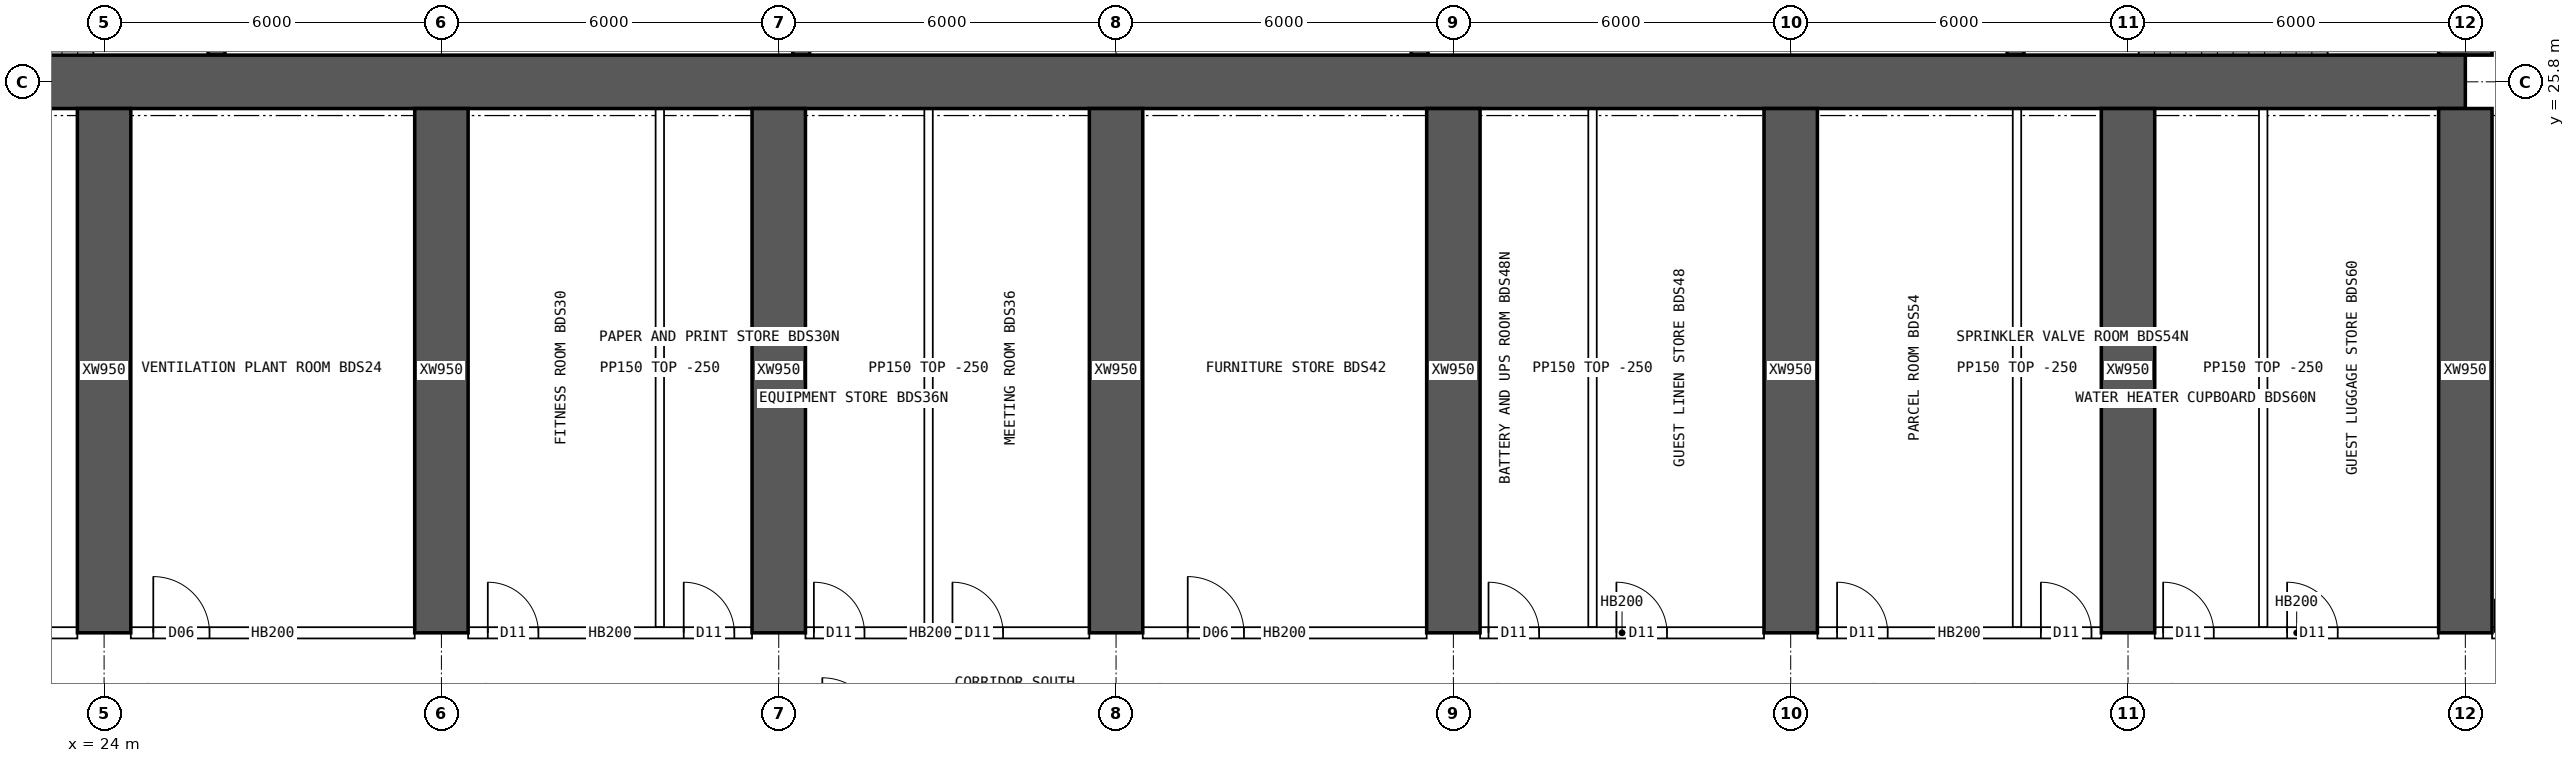
"""IFC4 building model, lengths in metres.
Left out: names, types, materials, properties, quantities, classifications, styles, units other than length and angle.
Written with IfcOpenShell. Run it as: python <this file> out.ifc"""

import sys

from ifc_helpers import new_model, si_unit, direction, frame, frame_2d, origin, place, context, subcontext, project, spatial, rectangle, extrude, element, fill, save


model = new_model("IFC4")
c1 = context("Model", 3, precision=1e-05, world=origin(), true_north=direction((0.0, 1.0)))
c2 = subcontext(c1, "Body", "Model", "MODEL_VIEW")
j1 = project(units=[si_unit("LENGTHUNIT", "METRE"), si_unit("PLANEANGLEUNIT", "RADIAN")], contexts=[c1])
p1 = place(None, origin())
s1 = spatial("IfcSite", under=j1, at=p1, CompositionType="ELEMENT")
p2 = place(p1, origin())
s2 = spatial("IfcBuilding", under=s1, at=p2, CompositionType="ELEMENT")
p3 = place(p2, frame((0.0, 0.0, 76.15)))
s3 = spatial("IfcBuildingStorey", under=s2, at=p3, CompositionType="ELEMENT", Elevation=76.15)
p4 = place(p3, frame((18.0, 25.8, 0.0), z_axis=(0.0, 0.0, 1.0), x_axis=(1.0, 0.0, 0.0)))
e1 = element("IfcWall", 1, at=p4, inside=s3, PredefinedType="SHEAR", context=c2, shape_type="SweptSolid", body=[
    extrude(rectangle(XDim=48.0, YDim=0.95, at=frame_2d((24.0, 0.0))), origin(), (0.0, 0.0, 1.0), 4.5),
])
p5 = place(p3, frame((66.0, 26.275, 0.0), z_axis=(0.0, 0.0, 1.0), x_axis=(0.0, 1.0, 0.0)))
e2 = element("IfcWall", 2, at=p5, inside=s3, PredefinedType="SHEAR", context=c2, shape_type="SweptSolid", body=[
    extrude(rectangle(XDim=11.45, YDim=0.95, at=frame_2d((5.725, 0.0))), origin(), (0.0, 0.0, 1.0), 4.5),
])
p6 = place(p5, frame((5.025, 0.0, 0.0)))
e3 = element("IfcOpeningElement", 3, at=p6, cuts=e2, PredefinedType="OPENING", context=c2, shape_type="SweptSolid", body=[
    extrude(rectangle(XDim=1.2, YDim=2.1, at=frame_2d((0.6, 1.05))), frame((0.0, 0.485, 0.0), z_axis=(0.0, -1.0, 0.0), x_axis=(1.0, 0.0, 0.0)), (0.0, 0.0, 1.0), 0.97),
])
for number, where, z_axis, x_axis in (
    (4, (26.0, 26.275, 0.0), (0.0, 0.0, 1.0), (0.0, 1.0, 0.0)),
    (5, (58.0, 26.275, 0.0), (0.0, 0.0, 1.0), (0.0, 1.0, 0.0)),
    (6, (36.4, 26.275, 0.0), (0.0, 0.0, 1.0), (0.0, 1.0, 0.0)),
    (7, (47.4, 26.275, 0.0), (0.0, 0.0, 1.0), (0.0, 1.0, 0.0)),
):
    element("IfcWall", number, at=place(p3, frame(where, z_axis=z_axis, x_axis=x_axis)), inside=s3, PredefinedType="SHEAR", context=c2, shape_type="SweptSolid", body=[
        extrude(rectangle(XDim=3.975, YDim=0.3, at=frame_2d((1.988, 0.0))), origin(), (0.0, 0.0, 1.0), 4.5),
    ])
for number, where, z_axis, x_axis in (
    (8, (24.0, 16.0, 0.0), (0.0, 0.0, 1.0), (0.0, 1.0, 0.0)),
    (9, (30.0, 16.0, 0.0), (0.0, 0.0, 1.0), (0.0, 1.0, 0.0)),
    (10, (36.0, 16.0, 0.0), (0.0, 0.0, 1.0), (0.0, 1.0, 0.0)),
    (11, (42.0, 16.0, 0.0), (0.0, 0.0, 1.0), (0.0, 1.0, 0.0)),
    (12, (48.0, 16.0, 0.0), (0.0, 0.0, 1.0), (0.0, 1.0, 0.0)),
    (13, (54.0, 16.0, 0.0), (0.0, 0.0, 1.0), (0.0, 1.0, 0.0)),
    (14, (60.0, 16.0, 0.0), (0.0, 0.0, 1.0), (0.0, 1.0, 0.0)),
    (15, (66.0, 16.0, 0.0), (0.0, 0.0, 1.0), (0.0, 1.0, 0.0)),
):
    element("IfcWall", number, at=place(p3, frame(where, z_axis=z_axis, x_axis=x_axis)), inside=s3, PredefinedType="SHEAR", context=c2, shape_type="SweptSolid", body=[
        extrude(rectangle(XDim=9.325, YDim=0.95, at=frame_2d((4.663, 0.0))), origin(), (0.0, 0.0, 1.0), 4.5),
    ])
p7 = place(p3, frame((18.475, 16.0, 0.0), z_axis=(0.0, 0.0, 1.0), x_axis=(1.0, 0.0, 0.0)))
e16 = element("IfcWall", 16, at=p7, inside=s3, PredefinedType="SOLIDWALL", context=c2, shape_type="SweptSolid", body=[
    extrude(rectangle(XDim=5.05, YDim=0.2, at=frame_2d((2.525, 0.0))), origin(), (0.0, 0.0, 1.0), 4.25),
])
p8 = place(p7, frame((0.35, 0.0, 0.0)))
e17 = element("IfcOpeningElement", 17, at=p8, cuts=e16, PredefinedType="OPENING", context=c2, shape_type="SweptSolid", body=[
    extrude(rectangle(XDim=0.9, YDim=2.1, at=frame_2d((0.45, 1.05))), frame((0.0, 0.11, 0.0), z_axis=(0.0, -1.0, 0.0), x_axis=(1.0, 0.0, 0.0)), (0.0, 0.0, 1.0), 0.22),
])
p9 = place(p7, frame((3.195, 0.0, 0.0)))
e18 = element("IfcOpeningElement", 18, at=p9, cuts=e16, PredefinedType="OPENING", context=c2, shape_type="SweptSolid", body=[
    extrude(rectangle(XDim=0.9, YDim=2.1, at=frame_2d((0.45, 1.05))), frame((0.0, 0.11, 0.0), z_axis=(0.0, -1.0, 0.0), x_axis=(1.0, 0.0, 0.0)), (0.0, 0.0, 1.0), 0.22),
])
p10 = place(p3, frame((24.475, 16.0, 0.0), z_axis=(0.0, 0.0, 1.0), x_axis=(1.0, 0.0, 0.0)))
e19 = element("IfcWall", 19, at=p10, inside=s3, PredefinedType="SOLIDWALL", context=c2, shape_type="SweptSolid", body=[
    extrude(rectangle(XDim=5.05, YDim=0.2, at=frame_2d((2.525, 0.0))), origin(), (0.0, 0.0, 1.0), 4.25),
])
p11 = place(p10, frame((0.4, 0.0, 0.0)))
e20 = element("IfcOpeningElement", 20, at=p11, cuts=e19, PredefinedType="OPENING", context=c2, shape_type="SweptSolid", body=[
    extrude(rectangle(XDim=1.0, YDim=2.1, at=frame_2d((0.5, 1.05))), frame((0.0, 0.11, 0.0), z_axis=(0.0, -1.0, 0.0), x_axis=(1.0, 0.0, 0.0)), (0.0, 0.0, 1.0), 0.22),
])
p12 = place(p3, frame((30.475, 16.0, 0.0), z_axis=(0.0, 0.0, 1.0), x_axis=(1.0, 0.0, 0.0)))
e21 = element("IfcWall", 21, at=p12, inside=s3, PredefinedType="SOLIDWALL", context=c2, shape_type="SweptSolid", body=[
    extrude(rectangle(XDim=5.05, YDim=0.2, at=frame_2d((2.525, 0.0))), origin(), (0.0, 0.0, 1.0), 4.25),
])
p13 = place(p12, frame((0.35, 0.0, 0.0)))
e22 = element("IfcOpeningElement", 22, at=p13, cuts=e21, PredefinedType="OPENING", context=c2, shape_type="SweptSolid", body=[
    extrude(rectangle(XDim=0.9, YDim=2.1, at=frame_2d((0.45, 1.05))), frame((0.0, 0.11, 0.0), z_axis=(0.0, -1.0, 0.0), x_axis=(1.0, 0.0, 0.0)), (0.0, 0.0, 1.0), 0.22),
])
p14 = place(p12, frame((3.835, 0.0, 0.0)))
e23 = element("IfcOpeningElement", 23, at=p14, cuts=e21, PredefinedType="OPENING", context=c2, shape_type="SweptSolid", body=[
    extrude(rectangle(XDim=0.9, YDim=2.1, at=frame_2d((0.45, 1.05))), frame((0.0, 0.11, 0.0), z_axis=(0.0, -1.0, 0.0), x_axis=(1.0, 0.0, 0.0)), (0.0, 0.0, 1.0), 0.22),
])
p15 = place(p3, frame((36.475, 16.0, 0.0), z_axis=(0.0, 0.0, 1.0), x_axis=(1.0, 0.0, 0.0)))
e24 = element("IfcWall", 24, at=p15, inside=s3, PredefinedType="SOLIDWALL", context=c2, shape_type="SweptSolid", body=[
    extrude(rectangle(XDim=5.05, YDim=0.2, at=frame_2d((2.525, 0.0))), origin(), (0.0, 0.0, 1.0), 4.25),
])
p16 = place(p15, frame((0.15, 0.0, 0.0)))
e25 = element("IfcOpeningElement", 25, at=p16, cuts=e24, PredefinedType="OPENING", context=c2, shape_type="SweptSolid", body=[
    extrude(rectangle(XDim=0.9, YDim=2.1, at=frame_2d((0.45, 1.05))), frame((0.0, 0.11, 0.0), z_axis=(0.0, -1.0, 0.0), x_axis=(1.0, 0.0, 0.0)), (0.0, 0.0, 1.0), 0.22),
])
p17 = place(p15, frame((2.615, 0.0, 0.0)))
e26 = element("IfcOpeningElement", 26, at=p17, cuts=e24, PredefinedType="OPENING", context=c2, shape_type="SweptSolid", body=[
    extrude(rectangle(XDim=0.9, YDim=2.1, at=frame_2d((0.45, 1.05))), frame((0.0, 0.11, 0.0), z_axis=(0.0, -1.0, 0.0), x_axis=(1.0, 0.0, 0.0)), (0.0, 0.0, 1.0), 0.22),
])
p18 = place(p3, frame((42.475, 16.0, 0.0), z_axis=(0.0, 0.0, 1.0), x_axis=(1.0, 0.0, 0.0)))
e27 = element("IfcWall", 27, at=p18, inside=s3, PredefinedType="SOLIDWALL", context=c2, shape_type="SweptSolid", body=[
    extrude(rectangle(XDim=5.05, YDim=0.2, at=frame_2d((2.525, 0.0))), origin(), (0.0, 0.0, 1.0), 4.25),
])
p19 = place(p18, frame((0.8, 0.0, 0.0)))
e28 = element("IfcOpeningElement", 28, at=p19, cuts=e27, PredefinedType="OPENING", context=c2, shape_type="SweptSolid", body=[
    extrude(rectangle(XDim=1.0, YDim=2.1, at=frame_2d((0.5, 1.05))), frame((0.0, 0.11, 0.0), z_axis=(0.0, -1.0, 0.0), x_axis=(1.0, 0.0, 0.0)), (0.0, 0.0, 1.0), 0.22),
])
p20 = place(p3, frame((48.475, 16.0, 0.0), z_axis=(0.0, 0.0, 1.0), x_axis=(1.0, 0.0, 0.0)))
e29 = element("IfcWall", 29, at=p20, inside=s3, PredefinedType="SOLIDWALL", context=c2, shape_type="SweptSolid", body=[
    extrude(rectangle(XDim=5.05, YDim=0.2, at=frame_2d((2.525, 0.0))), origin(), (0.0, 0.0, 1.0), 4.25),
])
p21 = place(p20, frame((0.15, 0.0, 0.0)))
e30 = element("IfcOpeningElement", 30, at=p21, cuts=e29, PredefinedType="OPENING", context=c2, shape_type="SweptSolid", body=[
    extrude(rectangle(XDim=0.9, YDim=2.1, at=frame_2d((0.45, 1.05))), frame((0.0, 0.11, 0.0), z_axis=(0.0, -1.0, 0.0), x_axis=(1.0, 0.0, 0.0)), (0.0, 0.0, 1.0), 0.22),
])
p22 = place(p20, frame((2.425, 0.0, 0.0)))
e31 = element("IfcOpeningElement", 31, at=p22, cuts=e29, PredefinedType="OPENING", context=c2, shape_type="SweptSolid", body=[
    extrude(rectangle(XDim=0.9, YDim=2.1, at=frame_2d((0.45, 1.05))), frame((0.0, 0.11, 0.0), z_axis=(0.0, -1.0, 0.0), x_axis=(1.0, 0.0, 0.0)), (0.0, 0.0, 1.0), 0.22),
])
p23 = place(p3, frame((54.475, 16.0, 0.0), z_axis=(0.0, 0.0, 1.0), x_axis=(1.0, 0.0, 0.0)))
e32 = element("IfcWall", 32, at=p23, inside=s3, PredefinedType="SOLIDWALL", context=c2, shape_type="SweptSolid", body=[
    extrude(rectangle(XDim=5.05, YDim=0.2, at=frame_2d((2.525, 0.0))), origin(), (0.0, 0.0, 1.0), 4.25),
])
p24 = place(p23, frame((0.35, 0.0, 0.0)))
e33 = element("IfcOpeningElement", 33, at=p24, cuts=e32, PredefinedType="OPENING", context=c2, shape_type="SweptSolid", body=[
    extrude(rectangle(XDim=0.9, YDim=2.1, at=frame_2d((0.45, 1.05))), frame((0.0, 0.11, 0.0), z_axis=(0.0, -1.0, 0.0), x_axis=(1.0, 0.0, 0.0)), (0.0, 0.0, 1.0), 0.22),
])
p25 = place(p23, frame((3.975, 0.0, 0.0)))
e34 = element("IfcOpeningElement", 34, at=p25, cuts=e32, PredefinedType="OPENING", context=c2, shape_type="SweptSolid", body=[
    extrude(rectangle(XDim=0.9, YDim=2.1, at=frame_2d((0.45, 1.05))), frame((0.0, 0.11, 0.0), z_axis=(0.0, -1.0, 0.0), x_axis=(1.0, 0.0, 0.0)), (0.0, 0.0, 1.0), 0.22),
])
p26 = place(p3, frame((60.475, 16.0, 0.0), z_axis=(0.0, 0.0, 1.0), x_axis=(1.0, 0.0, 0.0)))
e35 = element("IfcWall", 35, at=p26, inside=s3, PredefinedType="SOLIDWALL", context=c2, shape_type="SweptSolid", body=[
    extrude(rectangle(XDim=5.05, YDim=0.2, at=frame_2d((2.525, 0.0))), origin(), (0.0, 0.0, 1.0), 4.25),
])
p27 = place(p26, frame((0.15, 0.0, 0.0)))
e36 = element("IfcOpeningElement", 36, at=p27, cuts=e35, PredefinedType="OPENING", context=c2, shape_type="SweptSolid", body=[
    extrude(rectangle(XDim=0.9, YDim=2.1, at=frame_2d((0.45, 1.05))), frame((0.0, 0.11, 0.0), z_axis=(0.0, -1.0, 0.0), x_axis=(1.0, 0.0, 0.0)), (0.0, 0.0, 1.0), 0.22),
])
p28 = place(p26, frame((2.355, 0.0, 0.0)))
e37 = element("IfcOpeningElement", 37, at=p28, cuts=e35, PredefinedType="OPENING", context=c2, shape_type="SweptSolid", body=[
    extrude(rectangle(XDim=0.9, YDim=2.1, at=frame_2d((0.45, 1.05))), frame((0.0, 0.11, 0.0), z_axis=(0.0, -1.0, 0.0), x_axis=(1.0, 0.0, 0.0)), (0.0, 0.0, 1.0), 0.22),
])
p29 = place(p3, frame((66.475, 16.0, 0.0), z_axis=(0.0, 0.0, 1.0), x_axis=(1.0, 0.0, 0.0)))
e38 = element("IfcWall", 38, at=p29, inside=s3, PredefinedType="SOLIDWALL", context=c2, shape_type="SweptSolid", body=[
    extrude(rectangle(XDim=1.925, YDim=0.2, at=frame_2d((0.962, 0.0))), origin(), (0.0, 0.0, 1.0), 4.25),
])
p30 = place(p29, frame((0.05, 0.0, 0.0)))
e39 = element("IfcOpeningElement", 39, at=p30, cuts=e38, PredefinedType="OPENING", context=c2, shape_type="SweptSolid", body=[
    extrude(rectangle(XDim=1.2, YDim=2.1, at=frame_2d((0.6, 1.05))), frame((0.0, 0.11, 0.0), z_axis=(0.0, -1.0, 0.0), x_axis=(1.0, 0.0, 0.0)), (0.0, 0.0, 1.0), 0.22),
])
for number, where, z_axis, x_axis in (
    (40, (33.885, 16.1, 0.0), (0.0, 0.0, 1.0), (0.0, 1.0, 0.0)),
    (41, (38.665, 16.1, 0.0), (0.0, 0.0, 1.0), (0.0, 1.0, 0.0)),
    (42, (50.475, 16.1, 0.0), (0.0, 0.0, 1.0), (0.0, 1.0, 0.0)),
    (43, (58.025, 16.1, 0.0), (0.0, 0.0, 1.0), (0.0, 1.0, 0.0)),
    (44, (62.405, 16.1, 0.0), (0.0, 0.0, 1.0), (0.0, 1.0, 0.0)),
):
    element("IfcWall", number, at=place(p3, frame(where, z_axis=z_axis, x_axis=x_axis)), inside=s3, PredefinedType="PARTITIONING", context=c2, shape_type="SweptSolid", body=[
        extrude(rectangle(XDim=9.225, YDim=0.15, at=frame_2d((4.612, 0.0))), origin(), (0.0, 0.0, 1.0), 4.25),
    ])
p31 = place(p11, origin())
e45 = element("IfcDoor", 45, at=p31, inside=s3, OperationType="SINGLE_SWING_LEFT", PredefinedType="DOOR", context=c2, shape_type="SweptSolid", body=[
    extrude(rectangle(XDim=1.0, YDim=2.1, at=frame_2d((0.5, 1.05))), frame((0.0, 0.025, 0.0), z_axis=(0.0, -1.0, 0.0), x_axis=(1.0, 0.0, 0.0)), (0.0, 0.0, 1.0), 0.05),
])
fill(e20, e45)
p32 = place(p13, origin())
e46 = element("IfcDoor", 46, at=p32, inside=s3, OperationType="SINGLE_SWING_LEFT", PredefinedType="DOOR", context=c2, shape_type="SweptSolid", body=[
    extrude(rectangle(XDim=0.9, YDim=2.1, at=frame_2d((0.45, 1.05))), frame((0.0, 0.025, 0.0), z_axis=(0.0, -1.0, 0.0), x_axis=(1.0, 0.0, 0.0)), (0.0, 0.0, 1.0), 0.05),
])
fill(e22, e46)
p33 = place(p14, origin())
e47 = element("IfcDoor", 47, at=p33, inside=s3, OperationType="SINGLE_SWING_LEFT", PredefinedType="DOOR", context=c2, shape_type="SweptSolid", body=[
    extrude(rectangle(XDim=0.9, YDim=2.1, at=frame_2d((0.45, 1.05))), frame((0.0, 0.025, 0.0), z_axis=(0.0, -1.0, 0.0), x_axis=(1.0, 0.0, 0.0)), (0.0, 0.0, 1.0), 0.05),
])
fill(e23, e47)
p34 = place(p16, origin())
e48 = element("IfcDoor", 48, at=p34, inside=s3, OperationType="SINGLE_SWING_LEFT", PredefinedType="DOOR", context=c2, shape_type="SweptSolid", body=[
    extrude(rectangle(XDim=0.9, YDim=2.1, at=frame_2d((0.45, 1.05))), frame((0.0, 0.025, 0.0), z_axis=(0.0, -1.0, 0.0), x_axis=(1.0, 0.0, 0.0)), (0.0, 0.0, 1.0), 0.05),
])
fill(e25, e48)
p35 = place(p17, origin())
e49 = element("IfcDoor", 49, at=p35, inside=s3, OperationType="SINGLE_SWING_LEFT", PredefinedType="DOOR", context=c2, shape_type="SweptSolid", body=[
    extrude(rectangle(XDim=0.9, YDim=2.1, at=frame_2d((0.45, 1.05))), frame((0.0, 0.025, 0.0), z_axis=(0.0, -1.0, 0.0), x_axis=(1.0, 0.0, 0.0)), (0.0, 0.0, 1.0), 0.05),
])
fill(e26, e49)
p36 = place(p19, origin())
e50 = element("IfcDoor", 50, at=p36, inside=s3, OperationType="SINGLE_SWING_LEFT", PredefinedType="DOOR", context=c2, shape_type="SweptSolid", body=[
    extrude(rectangle(XDim=1.0, YDim=2.1, at=frame_2d((0.5, 1.05))), frame((0.0, 0.025, 0.0), z_axis=(0.0, -1.0, 0.0), x_axis=(1.0, 0.0, 0.0)), (0.0, 0.0, 1.0), 0.05),
])
fill(e28, e50)
p37 = place(p21, origin())
e51 = element("IfcDoor", 51, at=p37, inside=s3, OperationType="SINGLE_SWING_LEFT", PredefinedType="DOOR", context=c2, shape_type="SweptSolid", body=[
    extrude(rectangle(XDim=0.9, YDim=2.1, at=frame_2d((0.45, 1.05))), frame((0.0, 0.025, 0.0), z_axis=(0.0, -1.0, 0.0), x_axis=(1.0, 0.0, 0.0)), (0.0, 0.0, 1.0), 0.05),
])
fill(e30, e51)
p38 = place(p22, origin())
e52 = element("IfcDoor", 52, at=p38, inside=s3, OperationType="SINGLE_SWING_LEFT", PredefinedType="DOOR", context=c2, shape_type="SweptSolid", body=[
    extrude(rectangle(XDim=0.9, YDim=2.1, at=frame_2d((0.45, 1.05))), frame((0.0, 0.025, 0.0), z_axis=(0.0, -1.0, 0.0), x_axis=(1.0, 0.0, 0.0)), (0.0, 0.0, 1.0), 0.05),
])
fill(e31, e52)
p39 = place(p24, origin())
e53 = element("IfcDoor", 53, at=p39, inside=s3, OperationType="SINGLE_SWING_LEFT", PredefinedType="DOOR", context=c2, shape_type="SweptSolid", body=[
    extrude(rectangle(XDim=0.9, YDim=2.1, at=frame_2d((0.45, 1.05))), frame((0.0, 0.025, 0.0), z_axis=(0.0, -1.0, 0.0), x_axis=(1.0, 0.0, 0.0)), (0.0, 0.0, 1.0), 0.05),
])
fill(e33, e53)
p40 = place(p25, origin())
e54 = element("IfcDoor", 54, at=p40, inside=s3, OperationType="SINGLE_SWING_LEFT", PredefinedType="DOOR", context=c2, shape_type="SweptSolid", body=[
    extrude(rectangle(XDim=0.9, YDim=2.1, at=frame_2d((0.45, 1.05))), frame((0.0, 0.025, 0.0), z_axis=(0.0, -1.0, 0.0), x_axis=(1.0, 0.0, 0.0)), (0.0, 0.0, 1.0), 0.05),
])
fill(e34, e54)
p41 = place(p27, origin())
e55 = element("IfcDoor", 55, at=p41, inside=s3, OperationType="SINGLE_SWING_LEFT", PredefinedType="DOOR", context=c2, shape_type="SweptSolid", body=[
    extrude(rectangle(XDim=0.9, YDim=2.1, at=frame_2d((0.45, 1.05))), frame((0.0, 0.025, 0.0), z_axis=(0.0, -1.0, 0.0), x_axis=(1.0, 0.0, 0.0)), (0.0, 0.0, 1.0), 0.05),
])
fill(e36, e55)
p42 = place(p28, origin())
e56 = element("IfcDoor", 56, at=p42, inside=s3, OperationType="SINGLE_SWING_LEFT", PredefinedType="DOOR", context=c2, shape_type="SweptSolid", body=[
    extrude(rectangle(XDim=0.9, YDim=2.1, at=frame_2d((0.45, 1.05))), frame((0.0, 0.025, 0.0), z_axis=(0.0, -1.0, 0.0), x_axis=(1.0, 0.0, 0.0)), (0.0, 0.0, 1.0), 0.05),
])
fill(e37, e56)
save(model, sys.argv[1])
